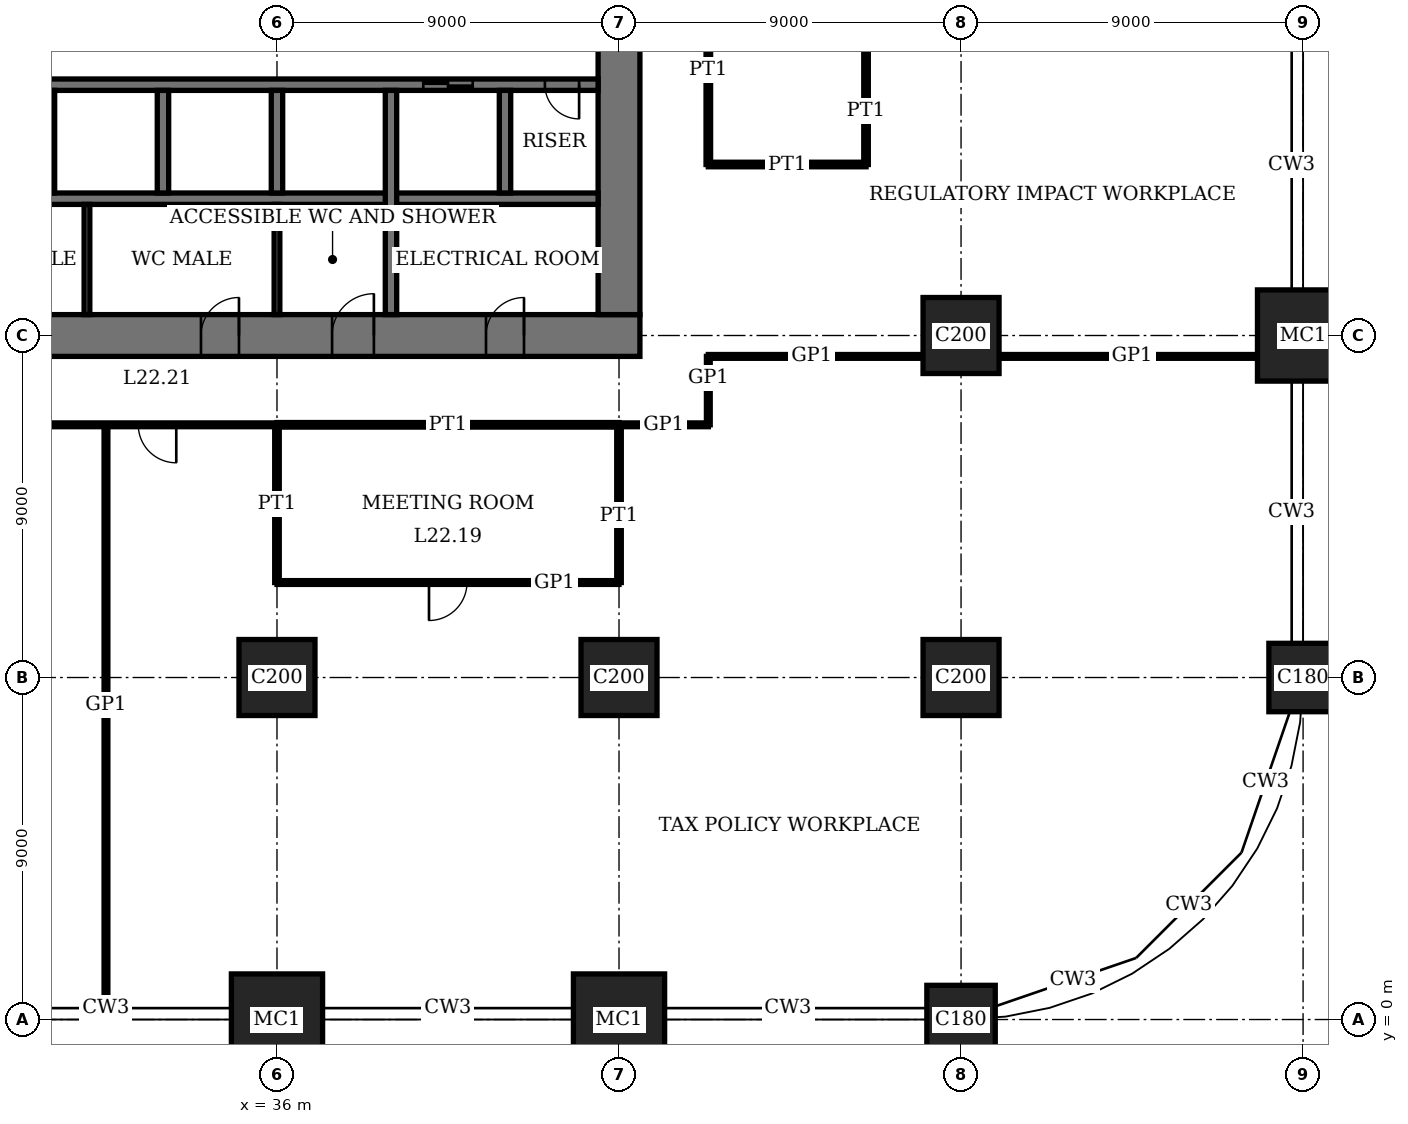
"""IFC4 building model, lengths in metres.
Left out: names, types, materials, properties, quantities, classifications, styles, units other than length and angle.
Written with IfcOpenShell. Run it as: python <this file> out.ifc"""

import sys

from ifc_helpers import new_model, si_unit, direction, frame, frame_2d, origin, origin_2d, place, context, subcontext, project, spatial, rectangle, extrude, element, fill, save


model = new_model("IFC4")
c1 = context("Model", 3, precision=1e-05, world=origin(), true_north=direction((0.0, 1.0)))
c2 = subcontext(c1, "Body", "Model", "MODEL_VIEW")
j1 = project(units=[si_unit("LENGTHUNIT", "METRE"), si_unit("PLANEANGLEUNIT", "RADIAN")], contexts=[c1])
p1 = place(None, origin())
s1 = spatial("IfcSite", under=j1, at=p1, CompositionType="ELEMENT")
p2 = place(p1, origin())
s2 = spatial("IfcBuilding", under=s1, at=p2, CompositionType="ELEMENT")
p3 = place(p2, frame((0.0, 0.0, 93.0)))
s3 = spatial("IfcBuildingStorey", under=s2, at=p3, CompositionType="ELEMENT", Elevation=93.0)
p4 = place(p3, frame((36.0, 0.0, 0.0), z_axis=(0.0, 0.0, 1.0), x_axis=(1.0, 0.0, 0.0)))
e1 = element("IfcColumn", 1, at=p4, inside=s3, PredefinedType="COLUMN", context=c2, shape_type="SweptSolid", body=[
    extrude(rectangle(XDim=2.4, YDim=2.4, at=origin_2d()), origin(), (0.0, 0.0, 1.0), 4.0),
])
p5 = place(p3, frame((36.0, 9.0, 0.0), z_axis=(0.0, 0.0, 1.0), x_axis=(1.0, 0.0, 0.0)))
e2 = element("IfcColumn", 2, at=p5, inside=s3, PredefinedType="COLUMN", context=c2, shape_type="SweptSolid", body=[
    extrude(rectangle(XDim=2.0, YDim=2.0, at=origin_2d()), origin(), (0.0, 0.0, 1.0), 4.0),
])
p6 = place(p3, frame((45.0, 0.0, 0.0), z_axis=(0.0, 0.0, 1.0), x_axis=(1.0, 0.0, 0.0)))
e3 = element("IfcColumn", 3, at=p6, inside=s3, PredefinedType="COLUMN", context=c2, shape_type="SweptSolid", body=[
    extrude(rectangle(XDim=2.4, YDim=2.4, at=origin_2d()), origin(), (0.0, 0.0, 1.0), 4.0),
])
p7 = place(p3, frame((45.0, 9.0, 0.0), z_axis=(0.0, 0.0, 1.0), x_axis=(1.0, 0.0, 0.0)))
e4 = element("IfcColumn", 4, at=p7, inside=s3, PredefinedType="COLUMN", context=c2, shape_type="SweptSolid", body=[
    extrude(rectangle(XDim=2.0, YDim=2.0, at=origin_2d()), origin(), (0.0, 0.0, 1.0), 4.0),
])
p8 = place(p3, frame((54.0, 0.0, 0.0), z_axis=(0.0, 0.0, 1.0), x_axis=(1.0, 0.0, 0.0)))
e5 = element("IfcColumn", 5, at=p8, inside=s3, PredefinedType="COLUMN", context=c2, shape_type="SweptSolid", body=[
    extrude(rectangle(XDim=1.8, YDim=1.8, at=origin_2d()), origin(), (0.0, 0.0, 1.0), 4.0),
])
for number, where, z_axis, x_axis in (
    (6, (54.0, 9.0, 0.0), (0.0, 0.0, 1.0), (1.0, 0.0, 0.0)),
    (7, (54.0, 18.0, 0.0), (0.0, 0.0, 1.0), (1.0, 0.0, 0.0)),
):
    element("IfcColumn", number, at=place(p3, frame(where, z_axis=z_axis, x_axis=x_axis)), inside=s3, PredefinedType="COLUMN", context=c2, shape_type="SweptSolid", body=[
        extrude(rectangle(XDim=2.0, YDim=2.0, at=origin_2d()), origin(), (0.0, 0.0, 1.0), 4.0),
    ])
p9 = place(p3, frame((63.0, 9.0, 0.0), z_axis=(0.0, 0.0, 1.0), x_axis=(1.0, 0.0, 0.0)))
e8 = element("IfcColumn", 8, at=p9, inside=s3, PredefinedType="COLUMN", context=c2, shape_type="SweptSolid", body=[
    extrude(rectangle(XDim=1.8, YDim=1.8, at=origin_2d()), origin(), (0.0, 0.0, 1.0), 4.0),
])
p10 = place(p3, frame((63.0, 18.0, 0.0), z_axis=(0.0, 0.0, 1.0), x_axis=(1.0, 0.0, 0.0)))
e9 = element("IfcColumn", 9, at=p10, inside=s3, PredefinedType="COLUMN", context=c2, shape_type="SweptSolid", body=[
    extrude(rectangle(XDim=2.4, YDim=2.4, at=origin_2d()), origin(), (0.0, 0.0, 1.0), 4.0),
])
p11 = place(p3, frame((17.45, 18.0, 0.0), z_axis=(0.0, 0.0, 1.0), x_axis=(1.0, 0.0, 0.0)))
e10 = element("IfcWall", 10, at=p11, inside=s3, PredefinedType="SHEAR", context=c2, shape_type="SweptSolid", body=[
    extrude(rectangle(XDim=28.1, YDim=1.1, at=frame_2d((14.05, 0.0))), origin(), (0.0, 0.0, 1.0), 4.0),
])
p12 = place(p11, frame((11.55, 0.0, 0.0)))
e11 = element("IfcOpeningElement", 11, at=p12, cuts=e10, PredefinedType="OPENING", context=c2, shape_type="SweptSolid", body=[
    extrude(rectangle(XDim=1.0, YDim=2.4, at=frame_2d((0.5, 1.2))), frame((0.0, 0.56, 0.0), z_axis=(0.0, -1.0, 0.0), x_axis=(1.0, 0.0, 0.0)), (0.0, 0.0, 1.0), 1.12),
])
p13 = place(p11, frame((16.55, 0.0, 0.0)))
e12 = element("IfcOpeningElement", 12, at=p13, cuts=e10, PredefinedType="OPENING", context=c2, shape_type="SweptSolid", body=[
    extrude(rectangle(XDim=1.0, YDim=2.4, at=frame_2d((0.5, 1.2))), frame((0.0, 0.56, 0.0), z_axis=(0.0, -1.0, 0.0), x_axis=(1.0, 0.0, 0.0)), (0.0, 0.0, 1.0), 1.12),
])
p14 = place(p11, frame((20.0, 0.0, 0.0)))
e13 = element("IfcOpeningElement", 13, at=p14, cuts=e10, PredefinedType="OPENING", context=c2, shape_type="SweptSolid", body=[
    extrude(rectangle(XDim=1.1, YDim=2.4, at=frame_2d((0.55, 1.2))), frame((0.0, 0.56, 0.0), z_axis=(0.0, -1.0, 0.0), x_axis=(1.0, 0.0, 0.0)), (0.0, 0.0, 1.0), 1.12),
])
p15 = place(p11, frame((24.05, 0.0, 0.0)))
e14 = element("IfcOpeningElement", 14, at=p15, cuts=e10, PredefinedType="OPENING", context=c2, shape_type="SweptSolid", body=[
    extrude(rectangle(XDim=1.0, YDim=2.4, at=frame_2d((0.5, 1.2))), frame((0.0, 0.56, 0.0), z_axis=(0.0, -1.0, 0.0), x_axis=(1.0, 0.0, 0.0)), (0.0, 0.0, 1.0), 1.12),
])
p16 = place(p3, frame((45.0, 18.55, 0.0), z_axis=(0.0, 0.0, 1.0), x_axis=(0.0, 1.0, 0.0)))
e15 = element("IfcWall", 15, at=p16, inside=s3, PredefinedType="SHEAR", context=c2, shape_type="SweptSolid", body=[
    extrude(rectangle(XDim=16.9, YDim=1.1, at=frame_2d((8.45, 0.0))), origin(), (0.0, 0.0, 1.0), 4.0),
])
p17 = place(p16, frame((8.45, 0.0, 0.0)))
e16 = element("IfcOpeningElement", 16, at=p17, cuts=e15, PredefinedType="OPENING", context=c2, shape_type="SweptSolid", body=[
    extrude(rectangle(XDim=1.8, YDim=2.4, at=frame_2d((0.9, 1.2))), frame((0.0, 0.56, 0.0), z_axis=(0.0, -1.0, 0.0), x_axis=(1.0, 0.0, 0.0)), (0.0, 0.0, 1.0), 1.12),
])
p18 = place(p3, frame((18.55, 24.6, 0.0), z_axis=(0.0, 0.0, 1.0), x_axis=(1.0, 0.0, 0.0)))
e17 = element("IfcWall", 17, at=p18, inside=s3, PredefinedType="SHEAR", context=c2, shape_type="SweptSolid", body=[
    extrude(rectangle(XDim=25.9, YDim=0.3, at=frame_2d((12.95, 0.0))), origin(), (0.0, 0.0, 1.0), 4.0),
])
p19 = place(p18, frame((4.95, 0.0, 0.0)))
e18 = element("IfcOpeningElement", 18, at=p19, cuts=e17, PredefinedType="OPENING", context=c2, shape_type="SweptSolid", body=[
    extrude(rectangle(XDim=1.0, YDim=2.4, at=frame_2d((0.5, 1.2))), frame((0.0, 0.16, 0.0), z_axis=(0.0, -1.0, 0.0), x_axis=(1.0, 0.0, 0.0)), (0.0, 0.0, 1.0), 0.32),
])
p20 = place(p18, frame((24.5, 0.0, 0.0)))
e19 = element("IfcOpeningElement", 19, at=p20, cuts=e17, PredefinedType="OPENING", context=c2, shape_type="SweptSolid", body=[
    extrude(rectangle(XDim=0.9, YDim=2.1, at=frame_2d((0.45, 1.05))), frame((0.0, 0.16, 0.0), z_axis=(0.0, -1.0, 0.0), x_axis=(1.0, 0.0, 0.0)), (0.0, 0.0, 1.0), 0.32),
])
p21 = place(p18, frame((21.3, 0.0, 0.0)))
e20 = element("IfcOpeningElement", 20, at=p21, cuts=e17, PredefinedType="OPENING", context=c2, shape_type="SweptSolid", body=[
    extrude(rectangle(XDim=1.3, YDim=2.4, at=frame_2d((0.65, 1.2))), frame((0.0, 0.16, 0.0), z_axis=(0.0, -1.0, 0.0), x_axis=(1.0, 0.0, 0.0)), (0.0, 0.0, 1.0), 0.32),
])
p22 = place(p3, frame((27.15, 21.6, 0.0), z_axis=(0.0, 0.0, 1.0), x_axis=(1.0, 0.0, 0.0)))
e21 = element("IfcWall", 21, at=p22, inside=s3, PredefinedType="SHEAR", context=c2, shape_type="SweptSolid", body=[
    extrude(rectangle(XDim=17.3, YDim=0.3, at=frame_2d((8.65, 0.0))), origin(), (0.0, 0.0, 1.0), 4.0),
])
for number, where, z_axis, x_axis in (
    (22, (30.0, 21.75, 0.0), (0.0, 0.0, 1.0), (0.0, 1.0, 0.0)),
    (23, (33.0, 21.75, 0.0), (0.0, 0.0, 1.0), (0.0, 1.0, 0.0)),
    (24, (36.0, 21.75, 0.0), (0.0, 0.0, 1.0), (0.0, 1.0, 0.0)),
):
    element("IfcWall", number, at=place(p3, frame(where, z_axis=z_axis, x_axis=x_axis)), inside=s3, PredefinedType="SHEAR", context=c2, shape_type="SweptSolid", body=[
        extrude(rectangle(XDim=2.7, YDim=0.3, at=frame_2d((1.35, 0.0))), origin(), (0.0, 0.0, 1.0), 4.0),
    ])
p23 = place(p3, frame((39.0, 18.55, 0.0), z_axis=(0.0, 0.0, 1.0), x_axis=(0.0, 1.0, 0.0)))
e25 = element("IfcWall", 25, at=p23, inside=s3, PredefinedType="SHEAR", context=c2, shape_type="SweptSolid", body=[
    extrude(rectangle(XDim=5.9, YDim=0.3, at=frame_2d((2.95, 0.0))), origin(), (0.0, 0.0, 1.0), 4.0),
])
p24 = place(p3, frame((42.0, 21.75, 0.0), z_axis=(0.0, 0.0, 1.0), x_axis=(0.0, 1.0, 0.0)))
e26 = element("IfcWall", 26, at=p24, inside=s3, PredefinedType="SHEAR", context=c2, shape_type="SweptSolid", body=[
    extrude(rectangle(XDim=2.7, YDim=0.3, at=frame_2d((1.35, 0.0))), origin(), (0.0, 0.0, 1.0), 4.0),
])
p25 = place(p3, frame((36.0, 11.5, 0.0), z_axis=(0.0, 0.0, 1.0), x_axis=(1.0, 0.0, 0.0)))
e27 = element("IfcWall", 27, at=p25, inside=s3, PredefinedType="PARTITIONING", context=c2, shape_type="SweptSolid", body=[
    extrude(rectangle(XDim=9.0, YDim=0.1, at=frame_2d((4.5, 0.0))), origin(), (0.0, 0.0, 1.0), 3.75),
])
p26 = place(p25, frame((4.0, 0.0, 0.0)))
e28 = element("IfcOpeningElement", 28, at=p26, cuts=e27, PredefinedType="OPENING", context=c2, shape_type="SweptSolid", body=[
    extrude(rectangle(XDim=1.0, YDim=2.4, at=frame_2d((0.5, 1.2))), frame((0.0, 0.06, 0.0), z_axis=(0.0, -1.0, 0.0), x_axis=(1.0, 0.0, 0.0)), (0.0, 0.0, 1.0), 0.12),
])
p27 = place(p3, frame((36.0, 15.65, 0.0), z_axis=(0.0, 0.0, 1.0), x_axis=(1.0, 0.0, 0.0)))
e29 = element("IfcWall", 29, at=p27, inside=s3, PredefinedType="PARTITIONING", context=c2, shape_type="SweptSolid", body=[
    extrude(rectangle(XDim=9.0, YDim=0.12, at=frame_2d((4.5, 0.0))), origin(), (0.0, 0.0, 1.0), 3.75),
])
p28 = place(p3, frame((27.0, 15.65, 0.0), z_axis=(0.0, 0.0, 1.0), x_axis=(1.0, 0.0, 0.0)))
e30 = element("IfcWall", 30, at=p28, inside=s3, PredefinedType="PARTITIONING", context=c2, shape_type="SweptSolid", body=[
    extrude(rectangle(XDim=9.0, YDim=0.1, at=frame_2d((4.5, 0.0))), origin(), (0.0, 0.0, 1.0), 3.75),
])
p29 = place(p28, frame((5.35, 0.0, 0.0)))
e31 = element("IfcOpeningElement", 31, at=p29, cuts=e30, PredefinedType="OPENING", context=c2, shape_type="SweptSolid", body=[
    extrude(rectangle(XDim=1.0, YDim=2.4, at=frame_2d((0.5, 1.2))), frame((0.0, 0.06, 0.0), z_axis=(0.0, -1.0, 0.0), x_axis=(1.0, 0.0, 0.0)), (0.0, 0.0, 1.0), 0.12),
])
p30 = place(p3, frame((45.0, 15.65, 0.0), z_axis=(0.0, 0.0, 1.0), x_axis=(1.0, 0.0, 0.0)))
e32 = element("IfcWall", 32, at=p30, inside=s3, PredefinedType="PARTITIONING", context=c2, shape_type="SweptSolid", body=[
    extrude(rectangle(XDim=2.35, YDim=0.1, at=frame_2d((1.175, 0.0))), origin(), (0.0, 0.0, 1.0), 3.75),
])
p31 = place(p3, frame((47.35, 17.45, 0.0), z_axis=(0.0, 0.0, 1.0), x_axis=(1.0, 0.0, 0.0)))
e33 = element("IfcWall", 33, at=p31, inside=s3, PredefinedType="PARTITIONING", context=c2, shape_type="SweptSolid", body=[
    extrude(rectangle(XDim=5.65, YDim=0.1, at=frame_2d((2.825, 0.0))), origin(), (0.0, 0.0, 1.0), 3.75),
])
p32 = place(p3, frame((55.0, 17.45, 0.0), z_axis=(0.0, 0.0, 1.0), x_axis=(1.0, 0.0, 0.0)))
e34 = element("IfcWall", 34, at=p32, inside=s3, PredefinedType="PARTITIONING", context=c2, shape_type="SweptSolid", body=[
    extrude(rectangle(XDim=6.8, YDim=0.1, at=frame_2d((3.4, 0.0))), origin(), (0.0, 0.0, 1.0), 3.75),
])
p33 = place(p3, frame((47.35, 22.5, 0.0), z_axis=(0.0, 0.0, 1.0), x_axis=(1.0, 0.0, 0.0)))
e35 = element("IfcWall", 35, at=p33, inside=s3, PredefinedType="PARTITIONING", context=c2, shape_type="SweptSolid", body=[
    extrude(rectangle(XDim=4.15, YDim=0.12, at=frame_2d((2.075, 0.0))), origin(), (0.0, 0.0, 1.0), 3.1),
])
p34 = place(p3, frame((31.5, 0.31, 0.0), z_axis=(0.0, 0.0, 1.0), x_axis=(0.0, 1.0, 0.0)))
e36 = element("IfcWall", 36, at=p34, inside=s3, PredefinedType="PARTITIONING", context=c2, shape_type="SweptSolid", body=[
    extrude(rectangle(XDim=15.34, YDim=0.1, at=frame_2d((7.67, 0.0))), origin(), (0.0, 0.0, 1.0), 3.75),
])
for number, where, z_axis, x_axis in (
    (37, (36.0, 11.5, 0.0), (0.0, 0.0, 1.0), (0.0, 1.0, 0.0)),
    (38, (45.0, 11.5, 0.0), (0.0, 0.0, 1.0), (0.0, 1.0, 0.0)),
):
    element("IfcWall", number, at=place(p3, frame(where, z_axis=z_axis, x_axis=x_axis)), inside=s3, PredefinedType="PARTITIONING", context=c2, shape_type="SweptSolid", body=[
        extrude(rectangle(XDim=4.15, YDim=0.12, at=frame_2d((2.075, 0.0))), origin(), (0.0, 0.0, 1.0), 3.05),
    ])
p35 = place(p3, frame((47.35, 22.5, 0.0), z_axis=(0.0, 0.0, 1.0), x_axis=(0.0, 1.0, 0.0)))
e39 = element("IfcWall", 39, at=p35, inside=s3, PredefinedType="PARTITIONING", context=c2, shape_type="SweptSolid", body=[
    extrude(rectangle(XDim=9.0, YDim=0.12, at=frame_2d((4.5, 0.0))), origin(), (0.0, 0.0, 1.0), 3.75),
])
p36 = place(p3, frame((47.35, 15.65, 0.0), z_axis=(0.0, 0.0, 1.0), x_axis=(0.0, 1.0, 0.0)))
e40 = element("IfcWall", 40, at=p36, inside=s3, PredefinedType="PARTITIONING", context=c2, shape_type="SweptSolid", body=[
    extrude(rectangle(XDim=1.8, YDim=0.1, at=frame_2d((0.9, 0.0))), origin(), (0.0, 0.0, 1.0), 3.75),
])
p37 = place(p3, frame((51.5, 22.5, 0.0), z_axis=(0.0, 0.0, 1.0), x_axis=(0.0, 1.0, 0.0)))
e41 = element("IfcWall", 41, at=p37, inside=s3, PredefinedType="PARTITIONING", context=c2, shape_type="SweptSolid", body=[
    extrude(rectangle(XDim=9.0, YDim=0.12, at=frame_2d((4.5, 0.0))), origin(), (0.0, 0.0, 1.0), 3.75),
])
p38 = place(p37, frame((4.0, 0.0, 0.0)))
e42 = element("IfcOpeningElement", 42, at=p38, cuts=e41, PredefinedType="OPENING", context=c2, shape_type="SweptSolid", body=[
    extrude(rectangle(XDim=1.0, YDim=2.4, at=frame_2d((0.5, 1.2))), frame((0.0, 0.07, 0.0), z_axis=(0.0, -1.0, 0.0), x_axis=(1.0, 0.0, 0.0)), (0.0, 0.0, 1.0), 0.14),
])
for number, where, z_axis, x_axis in (
    (43, (31.0, 18.55, 0.0), (0.0, 0.0, 1.0), (0.0, 1.0, 0.0)),
    (44, (36.0, 18.55, 0.0), (0.0, 0.0, 1.0), (0.0, 1.0, 0.0)),
):
    element("IfcWall", number, at=place(p3, frame(where, z_axis=z_axis, x_axis=x_axis)), inside=s3, PredefinedType="PARTITIONING", context=c2, shape_type="SweptSolid", body=[
        extrude(rectangle(XDim=2.9, YDim=0.15, at=frame_2d((1.45, 0.0))), origin(), (0.0, 0.0, 1.0), 3.75),
    ])
p39 = place(p13, origin())
e45 = element("IfcDoor", 45, at=p39, inside=s3, OperationType="SINGLE_SWING_LEFT", PredefinedType="DOOR", context=c2, shape_type="SweptSolid", body=[
    extrude(rectangle(XDim=1.0, YDim=2.4, at=frame_2d((0.5, 1.2))), frame((0.0, 0.025, 0.0), z_axis=(0.0, -1.0, 0.0), x_axis=(1.0, 0.0, 0.0)), (0.0, 0.0, 1.0), 0.05),
    extrude(rectangle(XDim=0.04, YDim=2.4, at=frame_2d((0.02, 1.2))), frame((0.0, 0.4, 0.0), z_axis=(0.0, -1.0, 0.0), x_axis=(1.0, 0.0, 0.0)), (0.0, 0.0, 1.0), 0.8),
    extrude(rectangle(XDim=0.04, YDim=2.4, at=frame_2d((0.98, 1.2))), frame((0.0, 0.4, 0.0), z_axis=(0.0, -1.0, 0.0), x_axis=(1.0, 0.0, 0.0)), (0.0, 0.0, 1.0), 0.8),
    extrude(rectangle(XDim=1.0, YDim=0.04, at=frame_2d((0.5, 2.38))), frame((0.0, 0.4, 0.0), z_axis=(0.0, -1.0, 0.0), x_axis=(1.0, 0.0, 0.0)), (0.0, 0.0, 1.0), 0.8),
])
fill(e12, e45)
p40 = place(p14, origin())
e46 = element("IfcDoor", 46, at=p40, inside=s3, OperationType="SINGLE_SWING_LEFT", PredefinedType="DOOR", context=c2, shape_type="SweptSolid", body=[
    extrude(rectangle(XDim=1.1, YDim=2.4, at=frame_2d((0.55, 1.2))), frame((0.0, 0.025, 0.0), z_axis=(0.0, -1.0, 0.0), x_axis=(1.0, 0.0, 0.0)), (0.0, 0.0, 1.0), 0.05),
    extrude(rectangle(XDim=0.04, YDim=2.4, at=frame_2d((0.02, 1.2))), frame((0.0, 0.44, 0.0), z_axis=(0.0, -1.0, 0.0), x_axis=(1.0, 0.0, 0.0)), (0.0, 0.0, 1.0), 0.88),
    extrude(rectangle(XDim=0.04, YDim=2.4, at=frame_2d((1.08, 1.2))), frame((0.0, 0.44, 0.0), z_axis=(0.0, -1.0, 0.0), x_axis=(1.0, 0.0, 0.0)), (0.0, 0.0, 1.0), 0.88),
    extrude(rectangle(XDim=1.1, YDim=0.04, at=frame_2d((0.55, 2.38))), frame((0.0, 0.44, 0.0), z_axis=(0.0, -1.0, 0.0), x_axis=(1.0, 0.0, 0.0)), (0.0, 0.0, 1.0), 0.88),
])
fill(e13, e46)
p41 = place(p15, origin())
e47 = element("IfcDoor", 47, at=p41, inside=s3, OperationType="SINGLE_SWING_LEFT", PredefinedType="DOOR", context=c2, shape_type="SweptSolid", body=[
    extrude(rectangle(XDim=1.0, YDim=2.4, at=frame_2d((0.5, 1.2))), frame((0.0, 0.025, 0.0), z_axis=(0.0, -1.0, 0.0), x_axis=(1.0, 0.0, 0.0)), (0.0, 0.0, 1.0), 0.05),
    extrude(rectangle(XDim=0.04, YDim=2.4, at=frame_2d((0.02, 1.2))), frame((0.0, 0.4, 0.0), z_axis=(0.0, -1.0, 0.0), x_axis=(1.0, 0.0, 0.0)), (0.0, 0.0, 1.0), 0.8),
    extrude(rectangle(XDim=0.04, YDim=2.4, at=frame_2d((0.98, 1.2))), frame((0.0, 0.4, 0.0), z_axis=(0.0, -1.0, 0.0), x_axis=(1.0, 0.0, 0.0)), (0.0, 0.0, 1.0), 0.8),
    extrude(rectangle(XDim=1.0, YDim=0.04, at=frame_2d((0.5, 2.38))), frame((0.0, 0.4, 0.0), z_axis=(0.0, -1.0, 0.0), x_axis=(1.0, 0.0, 0.0)), (0.0, 0.0, 1.0), 0.8),
])
fill(e14, e47)
p42 = place(p20, origin())
e48 = element("IfcDoor", 48, at=p42, inside=s3, OperationType="SINGLE_SWING_RIGHT", PredefinedType="DOOR", context=c2, shape_type="SweptSolid", body=[
    extrude(rectangle(XDim=0.9, YDim=2.1, at=frame_2d((0.45, 1.05))), frame((0.0, 0.03, 0.0), z_axis=(0.0, -1.0, 0.0), x_axis=(1.0, 0.0, 0.0)), (0.0, 0.0, 1.0), 0.06),
])
fill(e19, e48)
p43 = place(p26, origin())
e49 = element("IfcDoor", 49, at=p43, inside=s3, OperationType="SINGLE_SWING_LEFT", PredefinedType="DOOR", context=c2, shape_type="SweptSolid", body=[
    extrude(rectangle(XDim=1.0, YDim=2.4, at=frame_2d((0.5, 1.2))), frame((0.0, 0.02, 0.0), z_axis=(0.0, -1.0, 0.0), x_axis=(1.0, 0.0, 0.0)), (0.0, 0.0, 1.0), 0.04),
])
fill(e28, e49)
p44 = place(p29, origin())
e50 = element("IfcDoor", 50, at=p44, inside=s3, OperationType="SINGLE_SWING_RIGHT", PredefinedType="DOOR", context=c2, shape_type="SweptSolid", body=[
    extrude(rectangle(XDim=1.0, YDim=2.4, at=frame_2d((0.5, 1.2))), frame((0.0, 0.02, 0.0), z_axis=(0.0, -1.0, 0.0), x_axis=(1.0, 0.0, 0.0)), (0.0, 0.0, 1.0), 0.04),
])
fill(e31, e50)
p45 = place(p21, origin())
e51 = element("IfcDoor", 51, at=p45, inside=s3, OperationType="DOUBLE_DOOR_SLIDING", PredefinedType="DOOR", context=c2, shape_type="SweptSolid", body=[
    extrude(rectangle(XDim=1.3, YDim=2.4, at=frame_2d((0.65, 1.2))), frame((0.0, 0.02, 0.0), z_axis=(0.0, -1.0, 0.0), x_axis=(1.0, 0.0, 0.0)), (0.0, 0.0, 1.0), 0.04),
])
fill(e20, e51)
save(model, sys.argv[1])
